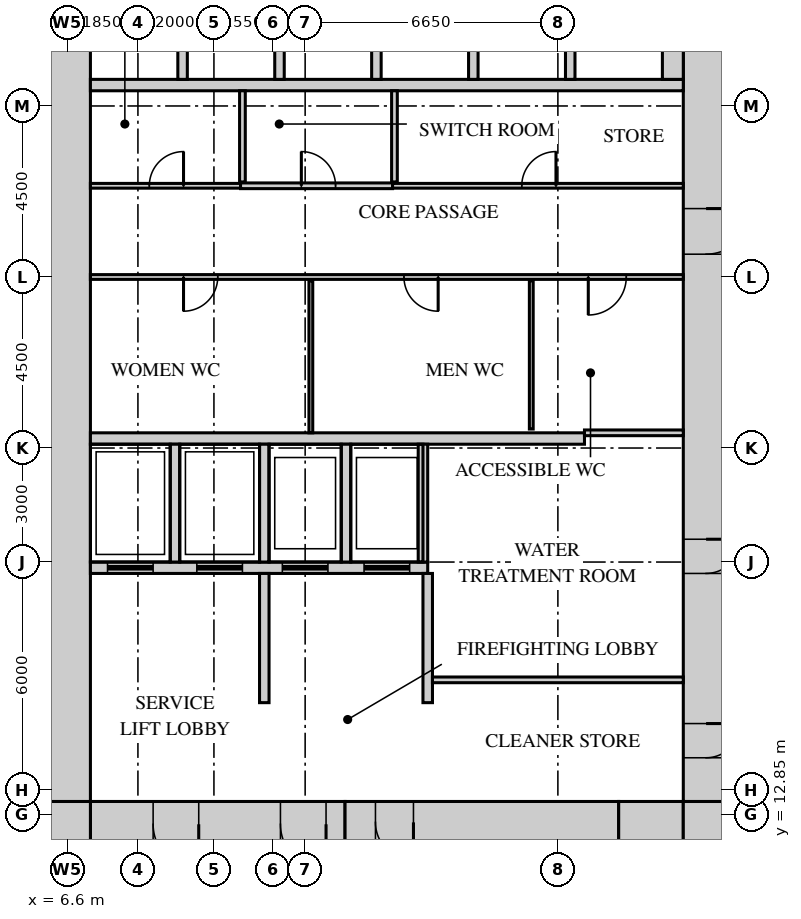
"""IFC4 building model, lengths in metres.
Left out: names, types, materials, properties, quantities, classifications, styles, units other than length and angle.
Written with IfcOpenShell. Run it as: python <this file> out.ifc"""

import sys

from ifc_helpers import new_model, si_unit, direction, frame, frame_2d, origin, place, context, subcontext, project, spatial, rectangle, extrude, source, transform, mapped, element, fill, save


model = new_model("IFC4")
c1 = context("Model", 3, precision=1e-05, world=origin(), true_north=direction((0.0, 1.0)))
c2 = subcontext(c1, "Body", "Model", "MODEL_VIEW")
j1 = project(units=[si_unit("LENGTHUNIT", "METRE"), si_unit("PLANEANGLEUNIT", "RADIAN")], contexts=[c1])
p1 = place(None, origin())
s1 = spatial("IfcSite", under=j1, at=p1, CompositionType="ELEMENT")
p2 = place(p1, origin())
s2 = spatial("IfcBuilding", under=s1, at=p2, CompositionType="ELEMENT")
p3 = place(p2, frame((0.0, 0.0, -4.5)))
s3 = spatial("IfcBuildingStorey", under=s2, at=p3, CompositionType="ELEMENT", Elevation=-4.5)
m1 = source(origin(), c2, "Body", "SweptSolid", [
    extrude(rectangle(XDim=6.7, YDim=1.2, at=frame_2d((3.35, 0.0))), origin(), (0.0, 0.0, 1.0), 4.15),
])
p4 = place(p3, frame((7.2, 12.6, 0.0), z_axis=(0.0, 0.0, 1.0), x_axis=(1.0, 0.0, 0.0)))
e1 = element("IfcWall", 1, at=p4, inside=s3, PredefinedType="SHEAR", context=c2, shape_type="MappedRepresentation", body=[
    mapped(m1, transform((0.0, 0.0, 0.0))),
])
m2 = source(origin(), c2, "Body", "SweptSolid", [
    extrude(rectangle(XDim=1.2, YDim=2.1, at=frame_2d((0.6, 1.05))), frame((0.0, 0.61, 0.0), z_axis=(0.0, -1.0, 0.0), x_axis=(1.0, 0.0, 0.0)), (0.0, 0.0, 1.0), 1.22),
])
p5 = place(p4, frame((5.0, 0.0, 0.0)))
e2 = element("IfcOpeningElement", 2, at=p5, cuts=e1, PredefinedType="OPENING", context=c2, shape_type="MappedRepresentation", body=[
    mapped(m2, transform((0.0, 0.0, 0.0))),
])
p6 = place(p4, frame((1.65, 0.0, 0.0)))
e3 = element("IfcOpeningElement", 3, at=p6, cuts=e1, PredefinedType="OPENING", context=c2, shape_type="MappedRepresentation", body=[
    mapped(m2, transform((0.0, 0.0, 0.0))),
])
m3 = source(origin(), c2, "Body", "SweptSolid", [
    extrude(rectangle(XDim=7.2, YDim=1.1, at=frame_2d((3.6, 0.0))), origin(), (0.0, 0.0, 1.0), 4.15),
])
p7 = place(p3, frame((13.9, 12.65, 0.0), z_axis=(0.0, 0.0, 1.0), x_axis=(1.0, 0.0, 0.0)))
e4 = element("IfcWall", 4, at=p7, inside=s3, PredefinedType="SHEAR", context=c2, shape_type="MappedRepresentation", body=[
    mapped(m3, transform((0.0, 0.0, 0.0))),
])
m4 = source(origin(), c2, "Body", "SweptSolid", [
    extrude(rectangle(XDim=1.0, YDim=2.1, at=frame_2d((0.5, 1.05))), frame((0.0, 0.56, 0.0), z_axis=(0.0, -1.0, 0.0), x_axis=(1.0, 0.0, 0.0)), (0.0, 0.0, 1.0), 1.12),
])
p8 = place(p7, frame((0.8, 0.0, 0.0)))
e5 = element("IfcOpeningElement", 5, at=p8, cuts=e4, PredefinedType="OPENING", context=c2, shape_type="MappedRepresentation", body=[
    mapped(m4, transform((0.0, 0.0, 0.0))),
])
m5 = source(origin(), c2, "Body", "SweptSolid", [
    extrude(rectangle(XDim=1.7, YDim=1.2, at=frame_2d((0.85, 0.0))), origin(), (0.0, 0.0, 1.0), 4.15),
])
p9 = place(p3, frame((21.1, 12.6, 0.0), z_axis=(0.0, 0.0, 1.0), x_axis=(1.0, 0.0, 0.0)))
e6 = element("IfcWall", 6, at=p9, inside=s3, PredefinedType="SHEAR", context=c2, shape_type="MappedRepresentation", body=[
    mapped(m5, transform((0.0, 0.0, 0.0))),
])
m6 = source(origin(), c2, "Body", "SweptSolid", [
    extrude(rectangle(XDim=1.2, YDim=1.2, at=frame_2d((0.6, 0.0))), origin(), (0.0, 0.0, 1.0), 4.15),
])
for number, where, z_axis, x_axis in (
    (7, (22.8, 12.6, 0.0), (0.0, 0.0, 1.0), (1.0, 0.0, 0.0)),
    (8, (6.0, 12.6, 0.0), (0.0, 0.0, 1.0), (1.0, 0.0, 0.0)),
):
    element("IfcWall", number, at=place(p3, frame(where, z_axis=z_axis, x_axis=x_axis)), inside=s3, PredefinedType="SHEAR", context=c2, shape_type="MappedRepresentation", body=[
        mapped(m6, transform((0.0, 0.0, 0.0))),
    ])
m7 = source(origin(), c2, "Body", "SweptSolid", [
    extrude(rectangle(XDim=27.6, YDim=1.2, at=frame_2d((13.8, 0.0))), origin(), (0.0, 0.0, 1.0), 4.15),
])
p10 = place(p3, frame((23.4, 13.2, 0.0), z_axis=(0.0, 0.0, 1.0), x_axis=(0.0, 1.0, 0.0)))
e9 = element("IfcWall", 9, at=p10, inside=s3, PredefinedType="SHEAR", context=c2, shape_type="MappedRepresentation", body=[
    mapped(m7, transform((0.0, 0.0, 0.0))),
])
p11 = place(p10, frame((14.4, 0.0, 0.0)))
e10 = element("IfcOpeningElement", 10, at=p11, cuts=e9, PredefinedType="OPENING", context=c2, shape_type="MappedRepresentation", body=[
    mapped(m2, transform((0.0, 0.0, 0.0))),
])
m8 = source(origin(), c2, "Body", "SweptSolid", [
    extrude(rectangle(XDim=0.9, YDim=2.1, at=frame_2d((0.45, 1.05))), frame((0.0, 0.61, 0.0), z_axis=(0.0, -1.0, 0.0), x_axis=(1.0, 0.0, 0.0)), (0.0, 0.0, 1.0), 1.22),
])
p12 = place(p10, frame((1.15, 0.0, 0.0)))
e11 = element("IfcOpeningElement", 11, at=p12, cuts=e9, PredefinedType="OPENING", context=c2, shape_type="MappedRepresentation", body=[
    mapped(m8, transform((0.0, 0.0, 0.0))),
])
p13 = place(p10, frame((6.0, 0.0, 0.0)))
e12 = element("IfcOpeningElement", 12, at=p13, cuts=e9, PredefinedType="OPENING", context=c2, shape_type="MappedRepresentation", body=[
    mapped(m8, transform((0.0, 0.0, 0.0))),
])
p14 = place(p3, frame((6.6, 13.2, 0.0), z_axis=(0.0, 0.0, 1.0), x_axis=(0.0, 1.0, 0.0)))
e13 = element("IfcWall", 13, at=p14, inside=s3, PredefinedType="SHEAR", context=c2, shape_type="MappedRepresentation", body=[
    mapped(m7, transform((0.0, 0.0, 0.0))),
])
m9 = source(origin(), c2, "Body", "SweptSolid", [
    extrude(rectangle(XDim=13.0, YDim=0.3, at=frame_2d((6.5, 0.0))), origin(), (0.0, 0.0, 1.0), 4.15),
])
p15 = place(p3, frame((7.2, 22.75, 0.0), z_axis=(0.0, 0.0, 1.0), x_axis=(1.0, 0.0, 0.0)))
e14 = element("IfcWall", 14, at=p15, inside=s3, PredefinedType="STANDARD", context=c2, shape_type="MappedRepresentation", body=[
    mapped(m9, transform((0.0, 0.0, 0.0))),
])
m10 = source(origin(), c2, "Body", "SweptSolid", [
    extrude(rectangle(XDim=8.875, YDim=0.3, at=frame_2d((4.438, 0.0))), origin(), (0.0, 0.0, 1.0), 4.15),
])
p16 = place(p3, frame((7.2, 19.35, 0.0), z_axis=(0.0, 0.0, 1.0), x_axis=(1.0, 0.0, 0.0)))
e15 = element("IfcWall", 15, at=p16, inside=s3, PredefinedType="STANDARD", context=c2, shape_type="MappedRepresentation", body=[
    mapped(m10, transform((0.0, 0.0, 0.0))),
])
m11 = source(origin(), c2, "Body", "SweptSolid", [
    extrude(rectangle(XDim=1.2, YDim=2.1, at=frame_2d((0.6, 1.05))), frame((0.0, 0.16, 0.0), z_axis=(0.0, -1.0, 0.0), x_axis=(1.0, 0.0, 0.0)), (0.0, 0.0, 1.0), 0.32),
])
p17 = place(p16, frame((0.45, 0.0, 0.0)))
e16 = element("IfcOpeningElement", 16, at=p17, cuts=e15, PredefinedType="OPENING", context=c2, shape_type="MappedRepresentation", body=[
    mapped(m11, transform((0.0, 0.0, 0.0))),
])
p18 = place(p16, frame((2.8, 0.0, 0.0)))
e17 = element("IfcOpeningElement", 17, at=p18, cuts=e15, PredefinedType="OPENING", context=c2, shape_type="MappedRepresentation", body=[
    mapped(m11, transform((0.0, 0.0, 0.0))),
])
p19 = place(p16, frame((5.05, 0.0, 0.0)))
e18 = element("IfcOpeningElement", 18, at=p19, cuts=e15, PredefinedType="OPENING", context=c2, shape_type="MappedRepresentation", body=[
    mapped(m11, transform((0.0, 0.0, 0.0))),
])
p20 = place(p16, frame((7.2, 0.0, 0.0)))
e19 = element("IfcOpeningElement", 19, at=p20, cuts=e15, PredefinedType="OPENING", context=c2, shape_type="MappedRepresentation", body=[
    mapped(m11, transform((0.0, 0.0, 0.0))),
])
m12 = source(origin(), c2, "Body", "SweptSolid", [
    extrude(rectangle(XDim=15.6, YDim=0.3, at=frame_2d((7.8, 0.0))), origin(), (0.0, 0.0, 1.0), 4.15),
])
p21 = place(p3, frame((7.2, 32.05, 0.0), z_axis=(0.0, 0.0, 1.0), x_axis=(1.0, 0.0, 0.0)))
e20 = element("IfcWall", 20, at=p21, inside=s3, PredefinedType="STANDARD", context=c2, shape_type="MappedRepresentation", body=[
    mapped(m12, transform((0.0, 0.0, 0.0))),
])
m13 = source(origin(), c2, "Body", "SweptSolid", [
    extrude(rectangle(XDim=3.1, YDim=0.25, at=frame_2d((1.55, 0.0))), origin(), (0.0, 0.0, 1.0), 4.15),
])
for number, where, z_axis, x_axis in (
    (21, (9.425, 19.5, 0.0), (0.0, 0.0, 1.0), (0.0, 1.0, 0.0)),
    (22, (11.775, 19.5, 0.0), (0.0, 0.0, 1.0), (0.0, 1.0, 0.0)),
    (23, (13.925, 19.5, 0.0), (0.0, 0.0, 1.0), (0.0, 1.0, 0.0)),
    (24, (15.95, 19.5, 0.0), (0.0, 0.0, 1.0), (0.0, 1.0, 0.0)),
):
    element("IfcWall", number, at=place(p3, frame(where, z_axis=z_axis, x_axis=x_axis)), inside=s3, PredefinedType="STANDARD", context=c2, shape_type="MappedRepresentation", body=[
        mapped(m13, transform((0.0, 0.0, 0.0))),
    ])
m14 = source(origin(), c2, "Body", "SweptSolid", [
    extrude(rectangle(XDim=2.4, YDim=0.25, at=frame_2d((1.2, 0.0))), origin(), (0.0, 0.0, 1.0), 4.15),
])
for number, where, z_axis, x_axis in (
    (25, (9.625, 32.2, 0.0), (0.0, 0.0, 1.0), (0.0, 1.0, 0.0)),
    (26, (12.175, 32.2, 0.0), (0.0, 0.0, 1.0), (0.0, 1.0, 0.0)),
    (27, (14.725, 32.2, 0.0), (0.0, 0.0, 1.0), (0.0, 1.0, 0.0)),
    (28, (17.275, 32.2, 0.0), (0.0, 0.0, 1.0), (0.0, 1.0, 0.0)),
    (29, (19.825, 32.2, 0.0), (0.0, 0.0, 1.0), (0.0, 1.0, 0.0)),
):
    element("IfcWall", number, at=place(p3, frame(where, z_axis=z_axis, x_axis=x_axis)), inside=s3, PredefinedType="STANDARD", context=c2, shape_type="MappedRepresentation", body=[
        mapped(m14, transform((0.0, 0.0, 0.0))),
    ])
m15 = source(origin(), c2, "Body", "SweptSolid", [
    extrude(rectangle(XDim=2.4, YDim=0.55, at=frame_2d((1.2, 0.0))), origin(), (0.0, 0.0, 1.0), 4.15),
])
p22 = place(p3, frame((22.525, 32.2, 0.0), z_axis=(0.0, 0.0, 1.0), x_axis=(0.0, 1.0, 0.0)))
e30 = element("IfcWall", 30, at=p22, inside=s3, PredefinedType="STANDARD", context=c2, shape_type="MappedRepresentation", body=[
    mapped(m15, transform((0.0, 0.0, 0.0))),
])
m16 = source(origin(), c2, "Body", "SweptSolid", [
    extrude(rectangle(XDim=3.4, YDim=0.25, at=frame_2d((1.7, 0.0))), origin(), (0.0, 0.0, 1.0), 4.15),
])
for number, where, z_axis, x_axis in (
    (31, (16.075, 15.8, 0.0), (0.0, 0.0, 1.0), (0.0, 1.0, 0.0)),
    (32, (11.775, 15.8, 0.0), (0.0, 0.0, 1.0), (0.0, 1.0, 0.0)),
):
    element("IfcWall", number, at=place(p3, frame(where, z_axis=z_axis, x_axis=x_axis)), inside=s3, PredefinedType="STANDARD", context=c2, shape_type="MappedRepresentation", body=[
        mapped(m16, transform((0.0, 0.0, 0.0))),
    ])
m17 = source(origin(), c2, "Body", "SweptSolid", [
    extrude(rectangle(XDim=6.6, YDim=0.15, at=frame_2d((3.3, 0.0))), origin(), (0.0, 0.0, 1.0), 4.15),
])
p23 = place(p3, frame((16.2, 16.4, 0.0), z_axis=(0.0, 0.0, 1.0), x_axis=(1.0, 0.0, 0.0)))
e33 = element("IfcWall", 33, at=p23, inside=s3, PredefinedType="PARTITIONING", context=c2, shape_type="MappedRepresentation", body=[
    mapped(m17, transform((0.0, 0.0, 0.0))),
])
m18 = source(origin(), c2, "Body", "SweptSolid", [
    extrude(rectangle(XDim=4.0, YDim=0.1, at=frame_2d((2.0, 0.0))), origin(), (0.0, 0.0, 1.0), 4.15),
])
p24 = place(p3, frame((13.0, 22.9, 0.0), z_axis=(0.0, 0.0, 1.0), x_axis=(0.0, 1.0, 0.0)))
e34 = element("IfcWall", 34, at=p24, inside=s3, PredefinedType="PARTITIONING", context=c2, shape_type="MappedRepresentation", body=[
    mapped(m18, transform((0.0, 0.0, 0.0))),
])
m19 = source(origin(), c2, "Body", "SweptSolid", [
    extrude(rectangle(XDim=2.6, YDim=0.15, at=frame_2d((1.3, 0.0))), origin(), (0.0, 0.0, 1.0), 4.15),
])
p25 = place(p3, frame((20.2, 22.9, 0.0), z_axis=(0.0, 0.0, 1.0), x_axis=(1.0, 0.0, 0.0)))
e35 = element("IfcWall", 35, at=p25, inside=s3, PredefinedType="PARTITIONING", context=c2, shape_type="MappedRepresentation", body=[
    mapped(m19, transform((0.0, 0.0, 0.0))),
])
m20 = source(origin(), c2, "Body", "SweptSolid", [
    extrude(rectangle(XDim=3.9, YDim=0.1, at=frame_2d((1.95, 0.0))), origin(), (0.0, 0.0, 1.0), 4.15),
])
p26 = place(p3, frame((18.8, 23.0, 0.0), z_axis=(0.0, 0.0, 1.0), x_axis=(0.0, 1.0, 0.0)))
e36 = element("IfcWall", 36, at=p26, inside=s3, PredefinedType="PARTITIONING", context=c2, shape_type="MappedRepresentation", body=[
    mapped(m20, transform((0.0, 0.0, 0.0))),
])
m21 = source(origin(), c2, "Body", "SweptSolid", [
    extrude(rectangle(XDim=15.6, YDim=0.125, at=frame_2d((7.8, 0.0))), origin(), (0.0, 0.0, 1.0), 4.15),
])
p27 = place(p3, frame((7.2, 27.0, 0.0), z_axis=(0.0, 0.0, 1.0), x_axis=(1.0, 0.0, 0.0)))
e37 = element("IfcWall", 37, at=p27, inside=s3, PredefinedType="PARTITIONING", context=c2, shape_type="MappedRepresentation", body=[
    mapped(m21, transform((0.0, 0.0, 0.0))),
])
m22 = source(origin(), c2, "Body", "SweptSolid", [
    extrude(rectangle(XDim=0.9, YDim=2.1, at=frame_2d((0.45, 1.05))), frame((0.0, 0.073, 0.0), z_axis=(0.0, -1.0, 0.0), x_axis=(1.0, 0.0, 0.0)), (0.0, 0.0, 1.0), 0.145),
])
p28 = place(p27, frame((2.45, 0.0, 0.0)))
e38 = element("IfcOpeningElement", 38, at=p28, cuts=e37, PredefinedType="OPENING", context=c2, shape_type="MappedRepresentation", body=[
    mapped(m22, transform((0.0, 0.0, 0.0))),
])
p29 = place(p27, frame((8.25, 0.0, 0.0)))
e39 = element("IfcOpeningElement", 39, at=p29, cuts=e37, PredefinedType="OPENING", context=c2, shape_type="MappedRepresentation", body=[
    mapped(m22, transform((0.0, 0.0, 0.0))),
])
m23 = source(origin(), c2, "Body", "SweptSolid", [
    extrude(rectangle(XDim=1.0, YDim=2.1, at=frame_2d((0.5, 1.05))), frame((0.0, 0.073, 0.0), z_axis=(0.0, -1.0, 0.0), x_axis=(1.0, 0.0, 0.0)), (0.0, 0.0, 1.0), 0.145),
])
p30 = place(p27, frame((13.1, 0.0, 0.0)))
e40 = element("IfcOpeningElement", 40, at=p30, cuts=e37, PredefinedType="OPENING", context=c2, shape_type="MappedRepresentation", body=[
    mapped(m23, transform((0.0, 0.0, 0.0))),
])
m24 = source(origin(), c2, "Body", "SweptSolid", [
    extrude(rectangle(XDim=3.95, YDim=0.125, at=frame_2d((1.975, 0.0))), origin(), (0.0, 0.0, 1.0), 4.15),
])
p31 = place(p3, frame((7.2, 29.4, 0.0), z_axis=(0.0, 0.0, 1.0), x_axis=(1.0, 0.0, 0.0)))
e41 = element("IfcWall", 41, at=p31, inside=s3, PredefinedType="PARTITIONING", context=c2, shape_type="MappedRepresentation", body=[
    mapped(m24, transform((0.0, 0.0, 0.0))),
])
p32 = place(p31, frame((1.55, 0.0, 0.0)))
e42 = element("IfcOpeningElement", 42, at=p32, cuts=e41, PredefinedType="OPENING", context=c2, shape_type="MappedRepresentation", body=[
    mapped(m22, transform((0.0, 0.0, 0.0))),
])
m25 = source(origin(), c2, "Body", "SweptSolid", [
    extrude(rectangle(XDim=4.0, YDim=0.15, at=frame_2d((2.0, 0.0))), origin(), (0.0, 0.0, 1.0), 4.15),
])
p33 = place(p3, frame((11.15, 29.4, 0.0), z_axis=(0.0, 0.0, 1.0), x_axis=(1.0, 0.0, 0.0)))
e43 = element("IfcWall", 43, at=p33, inside=s3, PredefinedType="PARTITIONING", context=c2, shape_type="MappedRepresentation", body=[
    mapped(m25, transform((0.0, 0.0, 0.0))),
])
m26 = source(origin(), c2, "Body", "SweptSolid", [
    extrude(rectangle(XDim=0.9, YDim=2.1, at=frame_2d((0.45, 1.05))), frame((0.0, 0.085, 0.0), z_axis=(0.0, -1.0, 0.0), x_axis=(1.0, 0.0, 0.0)), (0.0, 0.0, 1.0), 0.17),
])
p34 = place(p33, frame((1.6, 0.0, 0.0)))
e44 = element("IfcOpeningElement", 44, at=p34, cuts=e43, PredefinedType="OPENING", context=c2, shape_type="MappedRepresentation", body=[
    mapped(m26, transform((0.0, 0.0, 0.0))),
])
m27 = source(origin(), c2, "Body", "SweptSolid", [
    extrude(rectangle(XDim=7.65, YDim=0.125, at=frame_2d((3.825, 0.0))), origin(), (0.0, 0.0, 1.0), 4.15),
])
p35 = place(p3, frame((15.15, 29.4, 0.0), z_axis=(0.0, 0.0, 1.0), x_axis=(1.0, 0.0, 0.0)))
e45 = element("IfcWall", 45, at=p35, inside=s3, PredefinedType="PARTITIONING", context=c2, shape_type="MappedRepresentation", body=[
    mapped(m27, transform((0.0, 0.0, 0.0))),
])
p36 = place(p35, frame((3.4, 0.0, 0.0)))
e46 = element("IfcOpeningElement", 46, at=p36, cuts=e45, PredefinedType="OPENING", context=c2, shape_type="MappedRepresentation", body=[
    mapped(m22, transform((0.0, 0.0, 0.0))),
])
m28 = source(origin(), c2, "Body", "SweptSolid", [
    extrude(rectangle(XDim=2.4, YDim=0.15, at=frame_2d((1.2, 0.0))), origin(), (0.0, 0.0, 1.0), 4.15),
])
for number, where, z_axis, x_axis in (
    (47, (11.2, 29.5, 0.0), (0.0, 0.0, 1.0), (0.0, 1.0, 0.0)),
    (48, (15.2, 29.5, 0.0), (0.0, 0.0, 1.0), (0.0, 1.0, 0.0)),
):
    element("IfcWall", number, at=place(p3, frame(where, z_axis=z_axis, x_axis=x_axis)), inside=s3, PredefinedType="PARTITIONING", context=c2, shape_type="MappedRepresentation", body=[
        mapped(m28, transform((0.0, 0.0, 0.0))),
    ])
m29 = source(origin(), c2, "Body", "SweptSolid", [
    extrude(rectangle(XDim=1.2, YDim=2.1, at=frame_2d((0.6, 1.05))), frame((0.0, 0.55, 0.0), z_axis=(0.0, -1.0, 0.0), x_axis=(1.0, 0.0, 0.0)), (0.0, 0.0, 1.0), 1.1),
])
p37 = place(p11, origin())
e49 = element("IfcDoor", 49, at=p37, inside=s3, OperationType="SINGLE_SWING_RIGHT", PredefinedType="DOOR", context=c2, shape_type="MappedRepresentation", body=[
    mapped(m29, transform((0.0, 0.0, 0.0))),
])
fill(e10, e49)
m30 = source(origin(), c2, "Body", "SweptSolid", [
    extrude(rectangle(XDim=0.9, YDim=2.1, at=frame_2d((0.45, 1.05))), frame((0.0, 0.025, 0.0), z_axis=(0.0, -1.0, 0.0), x_axis=(1.0, 0.0, 0.0)), (0.0, 0.0, 1.0), 0.05),
])
p38 = place(p32, origin())
e50 = element("IfcDoor", 50, at=p38, inside=s3, OperationType="SINGLE_SWING_LEFT", PredefinedType="DOOR", context=c2, shape_type="MappedRepresentation", body=[
    mapped(m30, transform((0.0, 0.0, 0.0))),
])
fill(e42, e50)
p39 = place(p34, origin())
e51 = element("IfcDoor", 51, at=p39, inside=s3, OperationType="SINGLE_SWING_RIGHT", PredefinedType="DOOR", context=c2, shape_type="MappedRepresentation", body=[
    mapped(m30, transform((0.0, 0.0, 0.0))),
])
fill(e44, e51)
p40 = place(p36, origin())
e52 = element("IfcDoor", 52, at=p40, inside=s3, OperationType="SINGLE_SWING_LEFT", PredefinedType="DOOR", context=c2, shape_type="MappedRepresentation", body=[
    mapped(m30, transform((0.0, 0.0, 0.0))),
])
fill(e46, e52)
p41 = place(p28, origin())
e53 = element("IfcDoor", 53, at=p41, inside=s3, OperationType="SINGLE_SWING_LEFT", PredefinedType="DOOR", context=c2, shape_type="MappedRepresentation", body=[
    mapped(m30, transform((0.0, 0.0, 0.0))),
])
fill(e38, e53)
p42 = place(p29, origin())
e54 = element("IfcDoor", 54, at=p42, inside=s3, OperationType="SINGLE_SWING_RIGHT", PredefinedType="DOOR", context=c2, shape_type="MappedRepresentation", body=[
    mapped(m30, transform((0.0, 0.0, 0.0))),
])
fill(e39, e54)
m31 = source(origin(), c2, "Body", "SweptSolid", [
    extrude(rectangle(XDim=1.0, YDim=2.1, at=frame_2d((0.5, 1.05))), frame((0.0, 0.025, 0.0), z_axis=(0.0, -1.0, 0.0), x_axis=(1.0, 0.0, 0.0)), (0.0, 0.0, 1.0), 0.05),
])
p43 = place(p30, origin())
e55 = element("IfcDoor", 55, at=p43, inside=s3, OperationType="SINGLE_SWING_LEFT", PredefinedType="DOOR", context=c2, shape_type="MappedRepresentation", body=[
    mapped(m31, transform((0.0, 0.0, 0.0))),
])
fill(e40, e55)
m32 = source(origin(), c2, "Body", "SweptSolid", [
    extrude(rectangle(XDim=0.9, YDim=2.1, at=frame_2d((0.45, 1.05))), frame((0.0, 0.55, 0.0), z_axis=(0.0, -1.0, 0.0), x_axis=(1.0, 0.0, 0.0)), (0.0, 0.0, 1.0), 1.1),
])
p44 = place(p12, origin())
e56 = element("IfcDoor", 56, at=p44, inside=s3, OperationType="SINGLE_SWING_RIGHT", PredefinedType="DOOR", context=c2, shape_type="MappedRepresentation", body=[
    mapped(m32, transform((0.0, 0.0, 0.0))),
])
fill(e11, e56)
p45 = place(p13, origin())
e57 = element("IfcDoor", 57, at=p45, inside=s3, OperationType="SINGLE_SWING_RIGHT", PredefinedType="DOOR", context=c2, shape_type="MappedRepresentation", body=[
    mapped(m32, transform((0.0, 0.0, 0.0))),
])
fill(e12, e57)
p46 = place(p5, origin())
e58 = element("IfcDoor", 58, at=p46, inside=s3, OperationType="SINGLE_SWING_RIGHT", PredefinedType="DOOR", context=c2, shape_type="MappedRepresentation", body=[
    mapped(m29, transform((0.0, 0.0, 0.0))),
])
fill(e2, e58)
p47 = place(p6, origin())
e59 = element("IfcDoor", 59, at=p47, inside=s3, OperationType="SINGLE_SWING_RIGHT", PredefinedType="DOOR", context=c2, shape_type="MappedRepresentation", body=[
    mapped(m29, transform((0.0, 0.0, 0.0))),
])
fill(e3, e59)
m33 = source(origin(), c2, "Body", "SweptSolid", [
    extrude(rectangle(XDim=1.0, YDim=2.1, at=frame_2d((0.5, 1.05))), frame((0.0, 0.5, 0.0), z_axis=(0.0, -1.0, 0.0), x_axis=(1.0, 0.0, 0.0)), (0.0, 0.0, 1.0), 1.0),
])
p48 = place(p8, origin())
e60 = element("IfcDoor", 60, at=p48, inside=s3, OperationType="SINGLE_SWING_RIGHT", PredefinedType="DOOR", context=c2, shape_type="MappedRepresentation", body=[
    mapped(m33, transform((0.0, 0.0, 0.0))),
])
fill(e5, e60)
m34 = source(origin(), c2, "Body", "SweptSolid", [
    extrude(rectangle(XDim=1.2, YDim=2.1, at=frame_2d((0.6, 1.05))), frame((0.0, 0.025, 0.0), z_axis=(0.0, -1.0, 0.0), x_axis=(1.0, 0.0, 0.0)), (0.0, 0.0, 1.0), 0.05),
])
p49 = place(p17, origin())
e61 = element("IfcDoor", 61, at=p49, inside=s3, OperationType="DOUBLE_DOOR_SLIDING", PredefinedType="DOOR", context=c2, shape_type="MappedRepresentation", body=[
    mapped(m34, transform((0.0, 0.0, 0.0))),
])
fill(e16, e61)
p50 = place(p18, origin())
e62 = element("IfcDoor", 62, at=p50, inside=s3, OperationType="DOUBLE_DOOR_SLIDING", PredefinedType="DOOR", context=c2, shape_type="MappedRepresentation", body=[
    mapped(m34, transform((0.0, 0.0, 0.0))),
])
fill(e17, e62)
p51 = place(p19, origin())
e63 = element("IfcDoor", 63, at=p51, inside=s3, OperationType="DOUBLE_DOOR_SLIDING", PredefinedType="DOOR", context=c2, shape_type="MappedRepresentation", body=[
    mapped(m34, transform((0.0, 0.0, 0.0))),
])
fill(e18, e63)
p52 = place(p20, origin())
e64 = element("IfcDoor", 64, at=p52, inside=s3, OperationType="DOUBLE_DOOR_SLIDING", PredefinedType="DOOR", context=c2, shape_type="MappedRepresentation", body=[
    mapped(m34, transform((0.0, 0.0, 0.0))),
])
fill(e19, e64)
save(model, sys.argv[1])
